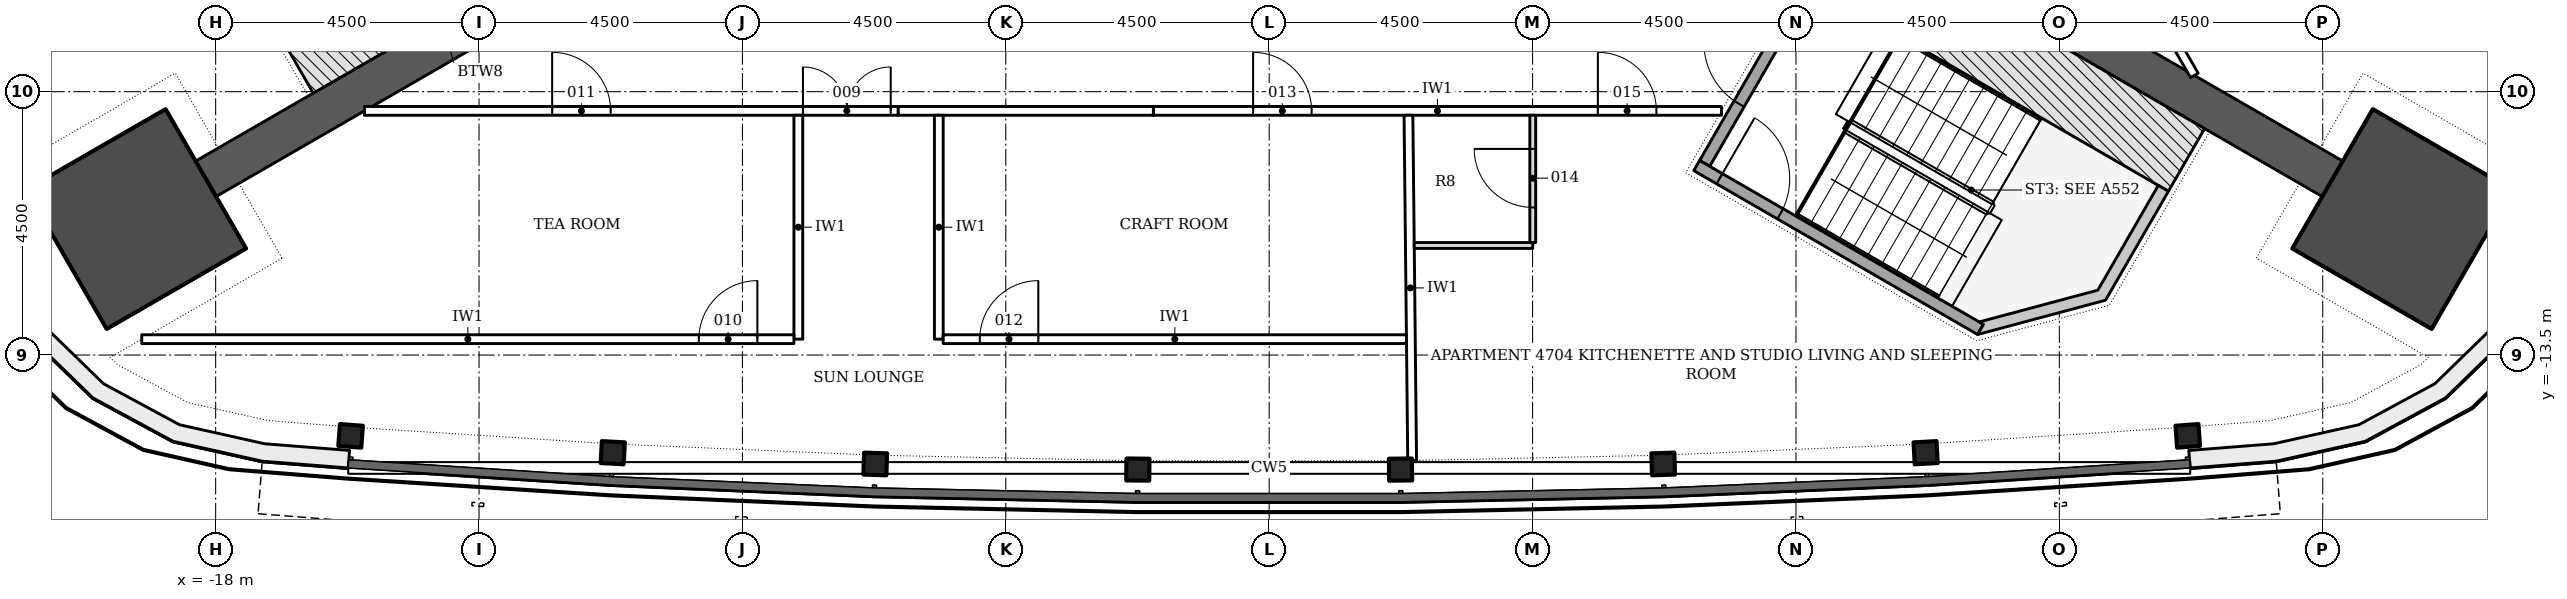
"""IFC4 building model, lengths in metres.
Left out: names, types, materials, properties, quantities, classifications, styles, units other than length and angle.
Written with IfcOpenShell. Run it as: python <this file> out.ifc"""

import sys

from ifc_helpers import new_model, si_unit, direction, frame, frame_2d, origin, origin_2d, place, context, subcontext, project, spatial, polyline, rectangle, i_section, outline, extrude, element, fill, save


model = new_model("IFC4")
c1 = context("Model", 3, precision=1e-05, world=origin(), true_north=direction((0.0, 1.0)))
c2 = subcontext(c1, "Body", "Model", "MODEL_VIEW")
j1 = project(units=[si_unit("LENGTHUNIT", "METRE"), si_unit("PLANEANGLEUNIT", "RADIAN")], contexts=[c1])
p1 = place(None, origin())
s1 = spatial("IfcSite", under=j1, at=p1, CompositionType="ELEMENT")
p2 = place(p1, origin())
s2 = spatial("IfcBuilding", under=s1, at=p2, CompositionType="ELEMENT")
p3 = place(p2, frame((0.0, 0.0, 185.1)))
s3 = spatial("IfcBuildingStorey", under=s2, at=p3, CompositionType="ELEMENT", Elevation=185.1)
for number, where, z_axis, x_axis in (
    (1, (-9.922, -5.728, -0.2), (0.0, 0.0, 1.0), (-0.866, -0.5, 0.0)),
    (2, (9.922, -5.728, -0.2), (0.0, 0.0, 1.0), (0.866, -0.5, 0.0)),
):
    element("IfcWall", number, at=place(p3, frame(where, z_axis=z_axis, x_axis=x_axis)), inside=s3, PredefinedType="SHEAR", context=c2, shape_type="SweptSolid", body=[
        extrude(rectangle(XDim=9.521, YDim=0.7, at=frame_2d((4.761, 0.0))), origin(), (0.0, 0.0, 1.0), 3.6),
    ])
for number, where, z_axis, x_axis in (
    (3, (-19.358, -11.177, -0.2), (0.0, 0.0, 1.0), (-0.866, -0.5, 0.0)),
    (4, (19.358, -11.177, -0.2), (0.0, 0.0, 1.0), (0.866, -0.5, 0.0)),
):
    element("IfcColumn", number, at=place(p3, frame(where, z_axis=z_axis, x_axis=x_axis)), inside=s3, PredefinedType="COLUMN", context=c2, shape_type="SweptSolid", body=[
        extrude(rectangle(XDim=2.75, YDim=2.75, at=origin_2d()), origin(), (0.0, 0.0, 1.0), 3.6),
    ])
for number, where, z_axis, x_axis in (
    (5, (-15.694, -14.881, -0.2), (0.0, 0.0, 1.0), (0.997, -0.075, 0.0)),
    (6, (-11.215, -15.169, -0.2), (0.0, 0.0, 1.0), (0.999, -0.053, 0.0)),
    (7, (-6.731, -15.361, -0.2), (0.0, 0.0, 1.0), (0.999, -0.032, 0.0)),
    (8, (-2.244, -15.457, -0.2), (0.0, 0.0, 1.0), (1.0, -0.011, 0.0)),
    (9, (2.244, -15.457, -0.2), (0.0, 0.0, 1.0), (1.0, 0.011, 0.0)),
    (10, (6.731, -15.361, -0.2), (0.0, 0.0, 1.0), (0.999, 0.032, 0.0)),
    (11, (11.215, -15.169, -0.2), (0.0, 0.0, 1.0), (0.999, 0.053, 0.0)),
    (12, (15.694, -14.881, -0.2), (0.0, 0.0, 1.0), (0.997, 0.075, 0.0)),
):
    element("IfcColumn", number, at=place(p3, frame(where, z_axis=z_axis, x_axis=x_axis)), inside=s3, PredefinedType="COLUMN", context=c2, shape_type="SweptSolid", body=[
        extrude(i_section(OverallWidth=0.394, OverallDepth=0.376, WebThickness=0.017, FlangeThickness=0.028, FilletRadius=0.015, at=origin_2d()), origin(), (0.0, 0.0, 1.0), 3.6),
    ])
p4 = place(p3, origin())
e13 = element("IfcWall", 13, at=p4, inside=s3, PredefinedType="NOTDEFINED", context=c2, shape_type="SweptSolid", body=[
    extrude(outline(polyline([(-21.229, -5.913), (-21.865, -7.243), (-22.33, -8.73), (-22.374, -10.287), (-21.992, -11.798), (-21.213, -13.147), (-20.096, -14.233), (-18.726, -14.974), (-17.205, -15.313), (-15.735, -15.429), (-15.712, -15.13), (-17.16, -15.016), (-18.619, -14.69), (-19.917, -13.989), (-20.974, -12.961), (-21.711, -11.684), (-22.073, -10.254), (-22.032, -8.78), (-21.584, -7.353), (-20.959, -6.042), (-21.229, -5.913)])), origin(), (0.0, 0.0, 1.0), 3.3),
])
p5 = place(p3, origin())
e14 = element("IfcWall", 14, at=p5, inside=s3, PredefinedType="NOTDEFINED", context=c2, shape_type="SweptSolid", body=[
    extrude(outline(polyline([(15.735, -15.429), (17.205, -15.313), (18.726, -14.974), (20.096, -14.233), (21.213, -13.147), (21.992, -11.798), (22.374, -10.287), (22.33, -8.73), (21.865, -7.243), (21.229, -5.913), (20.959, -6.042), (21.584, -7.353), (22.032, -8.78), (22.073, -10.254), (21.711, -11.684), (20.974, -12.961), (19.917, -13.989), (18.619, -14.69), (17.16, -15.016), (15.712, -15.13), (15.735, -15.429)])), origin(), (0.0, 0.0, 1.0), 3.3),
])
p6 = place(p3, frame((-10.406, -4.89, -0.2), z_axis=(0.0, 0.0, 1.0), x_axis=(-0.866018442252, -0.500012057535, 0.0)))
e15 = element("IfcWall", 15, at=p6, inside=s3, PredefinedType="SHEAR", context=c2, shape_type="SweptSolid", body=[
    extrude(rectangle(XDim=7.2, YDim=1.236, at=frame_2d((3.6, 0.0))), origin(), (0.0, 0.0, 1.0), 3.6),
])
p7 = place(p3, frame((7.44, -10.226, -0.2), z_axis=(0.0, 0.0, 1.0), x_axis=(0.500022077904, 0.866012656725, 0.0)))
e16 = element("IfcWall", 16, at=p7, inside=s3, PredefinedType="SHEAR", context=c2, shape_type="SweptSolid", body=[
    extrude(rectangle(XDim=3.55, YDim=0.2, at=frame_2d((1.775, 0.0))), origin(), (0.0, 0.0, 1.0), 3.6),
])
p8 = place(p7, frame((1.175, 0.0, 0.2)))
e17 = element("IfcOpeningElement", 17, at=p8, cuts=e16, PredefinedType="OPENING", context=c2, shape_type="SweptSolid", body=[
    extrude(rectangle(XDim=1.2, YDim=2.1, at=frame_2d((0.6, 1.05))), frame((0.0, 0.11, 0.0), z_axis=(0.0, -1.0, 0.0), x_axis=(1.0, 0.0, 0.0)), (0.0, 0.0, 1.0), 0.22),
])
p9 = place(p3, frame((7.304, -10.262, -0.2), z_axis=(0.0, 0.0, 1.0), x_axis=(0.866026594901, -0.49999793692, 0.0)))
e18 = element("IfcWall", 18, at=p9, inside=s3, PredefinedType="SHEAR", context=c2, shape_type="SweptSolid", body=[
    extrude(rectangle(XDim=5.6, YDim=0.2, at=frame_2d((2.8, 0.0))), origin(), (0.0, 0.0, 1.0), 3.6),
])
p10 = place(p9, frame((0.45, 0.0, 0.2)))
e19 = element("IfcOpeningElement", 19, at=p10, cuts=e18, PredefinedType="OPENING", context=c2, shape_type="SweptSolid", body=[
    extrude(rectangle(XDim=1.2, YDim=2.1, at=frame_2d((0.6, 1.05))), frame((0.0, 0.11, 0.0), z_axis=(0.0, -1.0, 0.0), x_axis=(1.0, 0.0, 0.0)), (0.0, 0.0, 1.0), 0.22),
])
p11 = place(p3, frame((9.438, -6.566, -0.2), z_axis=(0.0, 0.0, 1.0), x_axis=(0.866026919366, -0.499997374926, 0.0)))
e20 = element("IfcWall", 20, at=p11, inside=s3, PredefinedType="SHEAR", context=c2, shape_type="SweptSolid", body=[
    extrude(rectangle(XDim=7.2, YDim=1.236, at=frame_2d((3.6, 0.0))), origin(), (0.0, 0.0, 1.0), 3.6),
])
p12 = place(p3, frame((0.0, 0.0, -0.2)))
e21 = element("IfcWall", 21, at=p12, inside=s3, PredefinedType="SHEAR", context=c2, shape_type="SweptSolid", body=[
    extrude(outline(polyline([(12.104, -13.149), (14.289, -12.563), (15.364, -10.701), (15.191, -10.601), (14.157, -12.392), (12.132, -12.934), (12.204, -12.976), (12.204, -12.976), (12.204, -12.976), (12.204, -12.976), (12.204, -12.976), (12.204, -12.976), (12.204, -12.976), (12.204, -12.976), (12.204, -12.976), (12.204, -12.976), (12.204, -12.976), (12.204, -12.976), (12.204, -12.976), (12.204, -12.976), (12.204, -12.976), (12.204, -12.976), (12.204, -12.976), (12.104, -13.149)])), origin(), (0.0, 0.0, 1.0), 3.6),
])
p13 = place(p3, frame((15.807, -8.722, 0.0), z_axis=(0.0, 0.0, 1.0), x_axis=(-0.500015802937, 0.866016279763, 0.0)))
e22 = element("IfcWall", 22, at=p13, inside=s3, PredefinedType="PARTITIONING", context=c2, shape_type="SweptSolid", body=[
    extrude(rectangle(XDim=4.755, YDim=0.15, at=frame_2d((2.377, 0.0))), origin(), (0.0, 0.0, 1.0), 2.847),
])
p14 = place(p3, frame((-15.457, -9.328, 0.0), z_axis=(0.0, 0.0, 1.0), x_axis=(1.0, 0.0, 0.0)))
e23 = element("IfcWall", 23, at=p14, inside=s3, PredefinedType="PARTITIONING", context=c2, shape_type="SweptSolid", body=[
    extrude(rectangle(XDim=9.12, YDim=0.15, at=frame_2d((4.56, 0.0))), origin(), (0.0, 0.0, 1.0), 2.847),
])
p15 = place(p14, frame((7.491, 0.0, 0.0)))
e24 = element("IfcOpeningElement", 24, at=p15, cuts=e23, PredefinedType="OPENING", context=c2, shape_type="SweptSolid", body=[
    extrude(rectangle(XDim=1.5, YDim=2.1, at=frame_2d((0.75, 1.05))), frame((0.0, 0.085, 0.0), z_axis=(0.0, -1.0, 0.0), x_axis=(1.0, 0.0, 0.0)), (0.0, 0.0, 1.0), 0.17),
])
p16 = place(p14, frame((3.206, 0.0, 0.0)))
e25 = element("IfcOpeningElement", 25, at=p16, cuts=e23, PredefinedType="OPENING", context=c2, shape_type="SweptSolid", body=[
    extrude(rectangle(XDim=1.0, YDim=2.1, at=frame_2d((0.5, 1.05))), frame((0.0, 0.085, 0.0), z_axis=(0.0, -1.0, 0.0), x_axis=(1.0, 0.0, 0.0)), (0.0, 0.0, 1.0), 0.17),
])
p17 = place(p3, frame((-1.979, -9.328, 0.0), z_axis=(0.0, 0.0, 1.0), x_axis=(1.0, 0.0, 0.0)))
e26 = element("IfcWall", 26, at=p17, inside=s3, PredefinedType="PARTITIONING", context=c2, shape_type="SweptSolid", body=[
    extrude(rectangle(XDim=9.706, YDim=0.15, at=frame_2d((4.853, 0.0))), origin(), (0.0, 0.0, 1.0), 2.847),
])
p18 = place(p17, frame((1.703, 0.0, 0.0)))
e27 = element("IfcOpeningElement", 27, at=p18, cuts=e26, PredefinedType="OPENING", context=c2, shape_type="SweptSolid", body=[
    extrude(rectangle(XDim=1.0, YDim=2.1, at=frame_2d((0.5, 1.05))), frame((0.0, 0.085, 0.0), z_axis=(0.0, -1.0, 0.0), x_axis=(1.0, 0.0, 0.0)), (0.0, 0.0, 1.0), 0.17),
])
p19 = place(p17, frame((7.594, 0.0, 0.0)))
e28 = element("IfcOpeningElement", 28, at=p19, cuts=e26, PredefinedType="OPENING", context=c2, shape_type="SweptSolid", body=[
    extrude(rectangle(XDim=1.0, YDim=2.1, at=frame_2d((0.5, 1.05))), frame((0.0, 0.085, 0.0), z_axis=(0.0, -1.0, 0.0), x_axis=(1.0, 0.0, 0.0)), (0.0, 0.0, 1.0), 0.17),
])
p20 = place(p3, frame((-6.337, -9.328, 0.0), z_axis=(0.0, 0.0, 1.0), x_axis=(1.0, 0.0, 0.0)))
e29 = element("IfcWall", 29, at=p20, inside=s3, PredefinedType="PARTITIONING", context=c2, shape_type="SweptSolid", body=[
    extrude(rectangle(XDim=4.359, YDim=0.15, at=frame_2d((2.179, 0.0))), origin(), (0.0, 0.0, 1.0), 2.847),
])
p21 = place(p3, frame((2.442, -15.302, 0.0), z_axis=(0.0, 0.0, 1.0), x_axis=(-0.01067687349, 0.999943000562, 0.0)))
e30 = element("IfcWall", 30, at=p21, inside=s3, PredefinedType="PARTITIONING", context=c2, shape_type="SweptSolid", body=[
    extrude(rectangle(XDim=5.899, YDim=0.15, at=frame_2d((2.95, 0.0))), origin(), (0.0, 0.0, 1.0), 3.4),
])
for number, where, z_axis, x_axis in (
    (31, (-8.045, -9.403, 0.0), (0.0, 0.0, 1.0), (0.0, -1.0, 0.0)),
    (32, (-5.645, -9.403, 0.0), (0.0, 0.0, 1.0), (0.0, -1.0, 0.0)),
):
    element("IfcWall", number, at=place(p3, frame(where, z_axis=z_axis, x_axis=x_axis)), inside=s3, PredefinedType="PARTITIONING", context=c2, shape_type="SweptSolid", body=[
        extrude(rectangle(XDim=3.825, YDim=0.15, at=frame_2d((1.913, 0.0))), origin(), (0.0, 0.0, 1.0), 3.4),
    ])
p22 = place(p3, frame((-19.262, -13.229, 0.0), z_axis=(0.0, 0.0, 1.0), x_axis=(1.0, 0.0, 0.0)))
e33 = element("IfcWall", 33, at=p22, inside=s3, PredefinedType="PARTITIONING", context=c2, shape_type="SweptSolid", body=[
    extrude(rectangle(XDim=11.143, YDim=0.15, at=frame_2d((5.571, 0.0))), origin(), (0.0, 0.0, 1.0), 2.847),
])
p23 = place(p22, frame((9.518, 0.0, 0.0)))
e34 = element("IfcOpeningElement", 34, at=p23, cuts=e33, PredefinedType="OPENING", context=c2, shape_type="SweptSolid", body=[
    extrude(rectangle(XDim=1.0, YDim=2.1, at=frame_2d((0.5, 1.05))), frame((0.0, 0.085, 0.0), z_axis=(0.0, -1.0, 0.0), x_axis=(1.0, 0.0, 0.0)), (0.0, 0.0, 1.0), 0.17),
])
p24 = place(p3, frame((-5.57, -13.229, 0.0), z_axis=(0.0, 0.0, 1.0), x_axis=(1.0, 0.0, 0.0)))
e35 = element("IfcWall", 35, at=p24, inside=s3, PredefinedType="PARTITIONING", context=c2, shape_type="SweptSolid", body=[
    extrude(rectangle(XDim=7.915, YDim=0.15, at=frame_2d((3.958, 0.0))), origin(), (0.0, 0.0, 1.0), 2.847),
])
p25 = place(p24, frame((0.625, 0.0, 0.0)))
e36 = element("IfcOpeningElement", 36, at=p25, cuts=e35, PredefinedType="OPENING", context=c2, shape_type="SweptSolid", body=[
    extrude(rectangle(XDim=1.0, YDim=2.1, at=frame_2d((0.5, 1.05))), frame((0.0, 0.085, 0.0), z_axis=(0.0, -1.0, 0.0), x_axis=(1.0, 0.0, 0.0)), (0.0, 0.0, 1.0), 0.17),
])
p26 = place(p3, frame((2.478, -11.628, 0.0), z_axis=(0.0, 0.0, 1.0), x_axis=(1.0, 0.0, 0.0)))
e37 = element("IfcWall", 37, at=p26, inside=s3, PredefinedType="PARTITIONING", context=c2, shape_type="SweptSolid", body=[
    extrude(rectangle(XDim=2.025, YDim=0.1, at=frame_2d((1.013, 0.0))), origin(), (0.0, 0.0, 1.0), 3.4),
])
p27 = place(p3, frame((4.503, -11.578, 0.0), z_axis=(0.0, 0.0, 1.0), x_axis=(0.0, 1.0, 0.0)))
e38 = element("IfcWall", 38, at=p27, inside=s3, PredefinedType="PARTITIONING", context=c2, shape_type="SweptSolid", body=[
    extrude(rectangle(XDim=2.175, YDim=0.1, at=frame_2d((1.087, 0.0))), origin(), (0.0, 0.0, 1.0), 3.4),
])
p28 = place(p27, frame((0.6, 0.0, 0.0)))
e39 = element("IfcOpeningElement", 39, at=p28, cuts=e38, PredefinedType="OPENING", context=c2, shape_type="SweptSolid", body=[
    extrude(rectangle(XDim=1.0, YDim=2.1, at=frame_2d((0.5, 1.05))), frame((0.0, 0.06, 0.0), z_axis=(0.0, -1.0, 0.0), x_axis=(1.0, 0.0, 0.0)), (0.0, 0.0, 1.0), 0.12),
])
p29 = place(p8, origin())
e40 = element("IfcDoor", 40, at=p29, inside=s3, OperationType="SINGLE_SWING_RIGHT", PredefinedType="DOOR", context=c2, shape_type="SweptSolid", body=[
    extrude(rectangle(XDim=1.2, YDim=2.1, at=frame_2d((0.6, 1.05))), frame((0.0, 0.025, 0.0), z_axis=(0.0, -1.0, 0.0), x_axis=(1.0, 0.0, 0.0)), (0.0, 0.0, 1.0), 0.05),
])
fill(e17, e40)
p30 = place(p10, origin())
e41 = element("IfcDoor", 41, at=p30, inside=s3, OperationType="SINGLE_SWING_LEFT", PredefinedType="DOOR", context=c2, shape_type="SweptSolid", body=[
    extrude(rectangle(XDim=1.2, YDim=2.1, at=frame_2d((0.6, 1.05))), frame((0.0, 0.025, 0.0), z_axis=(0.0, -1.0, 0.0), x_axis=(1.0, 0.0, 0.0)), (0.0, 0.0, 1.0), 0.05),
])
fill(e19, e41)
p31 = place(p15, origin())
e42 = element("IfcDoor", 42, at=p31, inside=s3, OperationType="DOUBLE_DOOR_SINGLE_SWING", PredefinedType="DOOR", context=c2, shape_type="SweptSolid", body=[
    extrude(rectangle(XDim=1.5, YDim=2.1, at=frame_2d((0.75, 1.05))), frame((0.0, 0.025, 0.0), z_axis=(0.0, -1.0, 0.0), x_axis=(1.0, 0.0, 0.0)), (0.0, 0.0, 1.0), 0.05),
])
fill(e24, e42)
p32 = place(p23, origin())
e43 = element("IfcDoor", 43, at=p32, inside=s3, OperationType="SINGLE_SWING_RIGHT", PredefinedType="DOOR", context=c2, shape_type="SweptSolid", body=[
    extrude(rectangle(XDim=1.0, YDim=2.1, at=frame_2d((0.5, 1.05))), frame((0.0, 0.025, 0.0), z_axis=(0.0, -1.0, 0.0), x_axis=(1.0, 0.0, 0.0)), (0.0, 0.0, 1.0), 0.05),
])
fill(e34, e43)
p33 = place(p16, origin())
e44 = element("IfcDoor", 44, at=p33, inside=s3, OperationType="SINGLE_SWING_LEFT", PredefinedType="DOOR", context=c2, shape_type="SweptSolid", body=[
    extrude(rectangle(XDim=1.0, YDim=2.1, at=frame_2d((0.5, 1.05))), frame((0.0, 0.025, 0.0), z_axis=(0.0, -1.0, 0.0), x_axis=(1.0, 0.0, 0.0)), (0.0, 0.0, 1.0), 0.05),
])
fill(e25, e44)
p34 = place(p25, origin())
e45 = element("IfcDoor", 45, at=p34, inside=s3, OperationType="SINGLE_SWING_RIGHT", PredefinedType="DOOR", context=c2, shape_type="SweptSolid", body=[
    extrude(rectangle(XDim=1.0, YDim=2.1, at=frame_2d((0.5, 1.05))), frame((0.0, 0.025, 0.0), z_axis=(0.0, -1.0, 0.0), x_axis=(1.0, 0.0, 0.0)), (0.0, 0.0, 1.0), 0.05),
])
fill(e36, e45)
p35 = place(p18, origin())
e46 = element("IfcDoor", 46, at=p35, inside=s3, OperationType="SINGLE_SWING_LEFT", PredefinedType="DOOR", context=c2, shape_type="SweptSolid", body=[
    extrude(rectangle(XDim=1.0, YDim=2.1, at=frame_2d((0.5, 1.05))), frame((0.0, 0.025, 0.0), z_axis=(0.0, -1.0, 0.0), x_axis=(1.0, 0.0, 0.0)), (0.0, 0.0, 1.0), 0.05),
])
fill(e27, e46)
p36 = place(p28, origin())
e47 = element("IfcDoor", 47, at=p36, inside=s3, OperationType="SINGLE_SWING_RIGHT", PredefinedType="DOOR", context=c2, shape_type="SweptSolid", body=[
    extrude(rectangle(XDim=1.0, YDim=2.1, at=frame_2d((0.5, 1.05))), frame((0.0, 0.025, 0.0), z_axis=(0.0, -1.0, 0.0), x_axis=(1.0, 0.0, 0.0)), (0.0, 0.0, 1.0), 0.05),
])
fill(e39, e47)
p37 = place(p19, origin())
e48 = element("IfcDoor", 48, at=p37, inside=s3, OperationType="SINGLE_SWING_LEFT", PredefinedType="DOOR", context=c2, shape_type="SweptSolid", body=[
    extrude(rectangle(XDim=1.0, YDim=2.1, at=frame_2d((0.5, 1.05))), frame((0.0, 0.025, 0.0), z_axis=(0.0, -1.0, 0.0), x_axis=(1.0, 0.0, 0.0)), (0.0, 0.0, 1.0), 0.05),
])
fill(e28, e48)
save(model, sys.argv[1])
